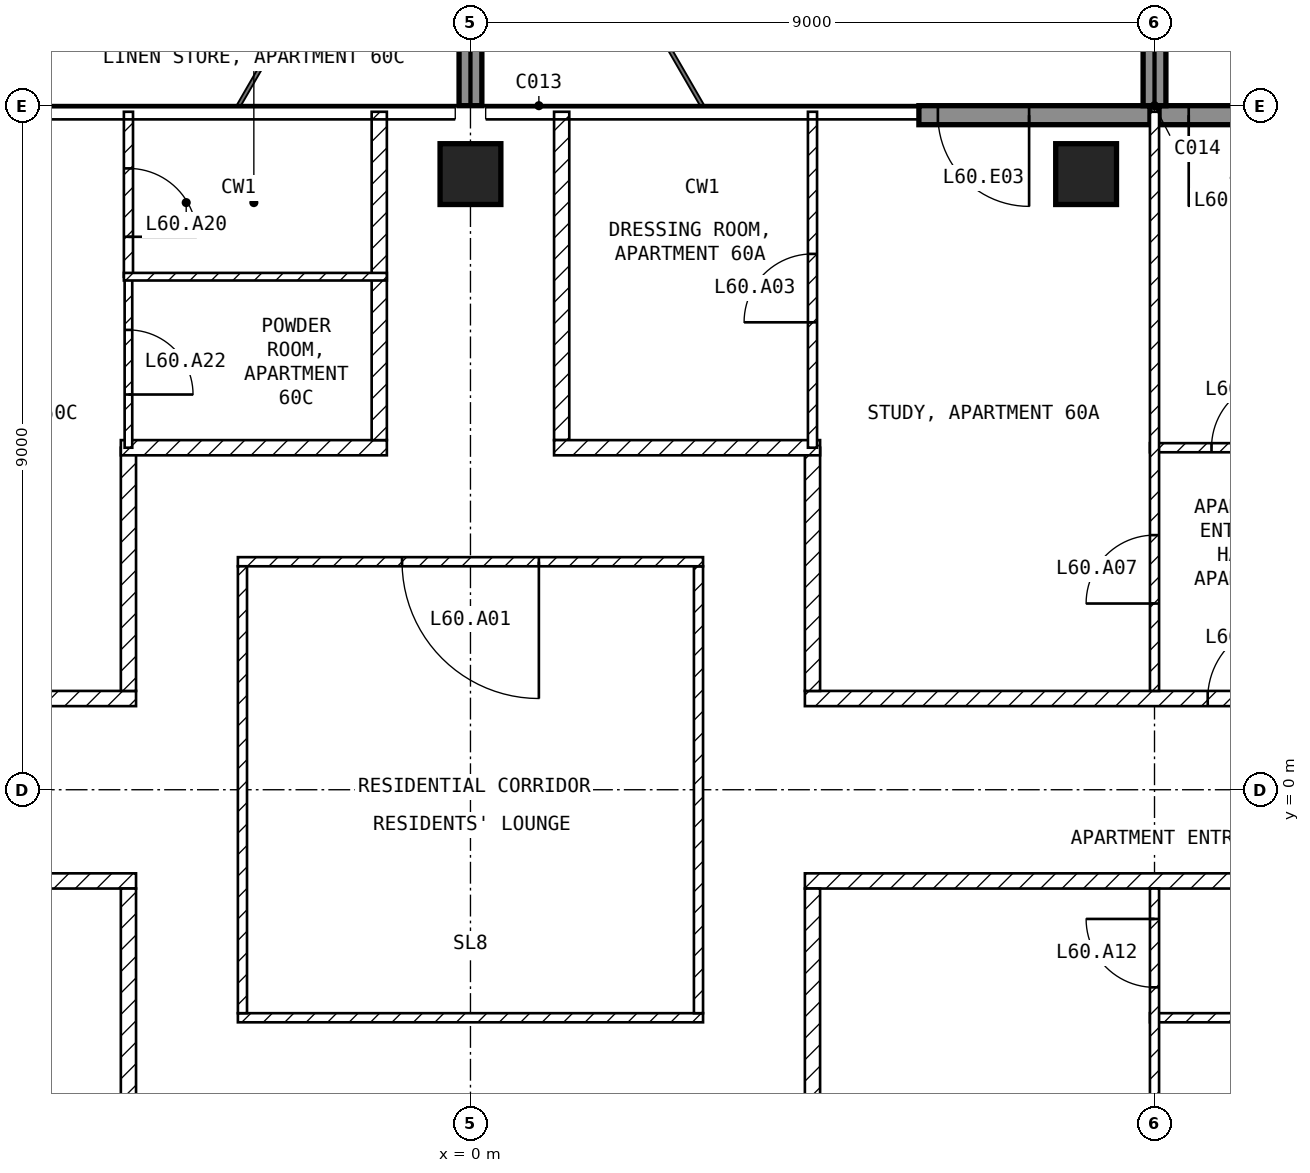
"""IFC4 building model, lengths in metres.
Left out: names, types, materials, properties, quantities, classifications, styles, units other than length and angle.
Written with IfcOpenShell. Run it as: python <this file> out.ifc"""

import sys

from ifc_helpers import new_model, si_unit, direction, frame, frame_2d, origin, origin_2d, place, context, subcontext, project, spatial, rectangle, extrude, element, fill, save


model = new_model("IFC4")
c1 = context("Model", 3, precision=1e-05, world=origin(), true_north=direction((0.0, 1.0)))
c2 = subcontext(c1, "Body", "Model", "MODEL_VIEW")
j1 = project(units=[si_unit("LENGTHUNIT", "METRE"), si_unit("PLANEANGLEUNIT", "RADIAN")], contexts=[c1])
p1 = place(None, origin())
s1 = spatial("IfcSite", under=j1, at=p1, CompositionType="ELEMENT")
p2 = place(p1, origin())
s2 = spatial("IfcBuilding", under=s1, at=p2, CompositionType="ELEMENT")
p3 = place(p2, frame((0.0, 0.0, 239.5)))
s3 = spatial("IfcBuildingStorey", under=s2, at=p3, CompositionType="ELEMENT", Elevation=239.5)
for number, where, z_axis, x_axis in (
    (1, (0.0, 8.1, -0.25), (0.0, 0.0, 1.0), (1.0, 0.0, 0.0)),
    (2, (8.1, 8.1, -0.25), (0.0, 0.0, 1.0), (1.0, 0.0, 0.0)),
):
    element("IfcColumn", number, at=place(p3, frame(where, z_axis=z_axis, x_axis=x_axis)), inside=s3, PredefinedType="COLUMN", context=c2, shape_type="SweptSolid", body=[
        extrude(rectangle(XDim=0.8, YDim=0.8, at=origin_2d()), origin(), (0.0, 0.0, 1.0), 3.5),
    ])
p4 = place(p3, frame((10.9, 8.875, 0.0), z_axis=(0.0, 0.0, 1.0), x_axis=(-1.0, 0.0, 0.0)))
e3 = element("IfcWall", 3, at=p4, inside=s3, PredefinedType="SOLIDWALL", context=c2, shape_type="SweptSolid", body=[
    extrude(rectangle(XDim=1.84, YDim=0.25, at=frame_2d((0.92, 0.0))), origin(), (0.0, 0.0, 1.0), 3.25),
])
p5 = place(p4, frame((0.25, 0.0, 0.0)))
e4 = element("IfcOpeningElement", 4, at=p5, cuts=e3, PredefinedType="OPENING", context=c2, shape_type="SweptSolid", body=[
    extrude(rectangle(XDim=1.2, YDim=2.4, at=frame_2d((0.6, 1.2))), frame((0.0, 0.135, 0.0), z_axis=(0.0, -1.0, 0.0), x_axis=(1.0, 0.0, 0.0)), (0.0, 0.0, 1.0), 0.27),
])
p6 = place(p3, frame((8.94, 8.875, 0.0), z_axis=(0.0, 0.0, 1.0), x_axis=(-1.0, 0.0, 0.0)))
e5 = element("IfcWall", 5, at=p6, inside=s3, PredefinedType="SOLIDWALL", context=c2, shape_type="SweptSolid", body=[
    extrude(rectangle(XDim=3.04, YDim=0.25, at=frame_2d((1.52, 0.0))), origin(), (0.0, 0.0, 1.0), 3.25),
])
p7 = place(p6, frame((1.59, 0.0, 0.0)))
e6 = element("IfcOpeningElement", 6, at=p7, cuts=e5, PredefinedType="OPENING", context=c2, shape_type="SweptSolid", body=[
    extrude(rectangle(XDim=1.2, YDim=2.4, at=frame_2d((0.6, 1.2))), frame((0.0, 0.135, 0.0), z_axis=(0.0, -1.0, 0.0), x_axis=(1.0, 0.0, 0.0)), (0.0, 0.0, 1.0), 0.27),
])
for number, where, z_axis, x_axis in (
    (7, (0.0, 9.0, 0.0), (0.0, 0.0, 1.0), (0.0, 1.0, 0.0)),
    (8, (9.0, 9.0, 0.0), (0.0, 0.0, 1.0), (0.0, 1.0, 0.0)),
):
    element("IfcWall", number, at=place(p3, frame(where, z_axis=z_axis, x_axis=x_axis)), inside=s3, PredefinedType="SOLIDWALL", context=c2, shape_type="SweptSolid", body=[
        extrude(rectangle(XDim=2.7, YDim=0.3, at=frame_2d((1.35, 0.0))), origin(), (0.0, 0.0, 1.0), 3.25),
    ])
p8 = place(p3, frame((-3.06, -3.0, 0.0), z_axis=(0.0, 0.0, 1.0), x_axis=(1.0, 0.0, 0.0)))
e9 = element("IfcWall", 9, at=p8, inside=s3, PredefinedType="PARTITIONING", context=c2, shape_type="SweptSolid", body=[
    extrude(rectangle(XDim=6.12, YDim=0.12, at=frame_2d((3.06, 0.0))), origin(), (0.0, 0.0, 1.0), 3.25),
])
p9 = place(p3, frame((3.0, -2.94, 0.0), z_axis=(0.0, 0.0, 1.0), x_axis=(0.0, 1.0, 0.0)))
e10 = element("IfcWall", 10, at=p9, inside=s3, PredefinedType="PARTITIONING", context=c2, shape_type="SweptSolid", body=[
    extrude(rectangle(XDim=5.88, YDim=0.12, at=frame_2d((2.94, 0.0))), origin(), (0.0, 0.0, 1.0), 3.25),
])
p10 = place(p3, frame((3.06, 3.0, 0.0), z_axis=(0.0, 0.0, 1.0), x_axis=(-1.0, 0.0, 0.0)))
e11 = element("IfcWall", 11, at=p10, inside=s3, PredefinedType="PARTITIONING", context=c2, shape_type="SweptSolid", body=[
    extrude(rectangle(XDim=6.12, YDim=0.12, at=frame_2d((3.06, 0.0))), origin(), (0.0, 0.0, 1.0), 3.25),
])
p11 = place(p10, frame((2.16, 0.0, 0.0)))
e12 = element("IfcOpeningElement", 12, at=p11, cuts=e11, PredefinedType="OPENING", context=c2, shape_type="SweptSolid", body=[
    extrude(rectangle(XDim=1.8, YDim=2.1, at=frame_2d((0.9, 1.05))), frame((0.0, 0.07, 0.0), z_axis=(0.0, -1.0, 0.0), x_axis=(1.0, 0.0, 0.0)), (0.0, 0.0, 1.0), 0.14),
])
p12 = place(p3, frame((-3.0, 2.94, 0.0), z_axis=(0.0, 0.0, 1.0), x_axis=(0.0, -1.0, 0.0)))
e13 = element("IfcWall", 13, at=p12, inside=s3, PredefinedType="PARTITIONING", context=c2, shape_type="SweptSolid", body=[
    extrude(rectangle(XDim=5.88, YDim=0.12, at=frame_2d((2.94, 0.0))), origin(), (0.0, 0.0, 1.0), 3.25),
])
p13 = place(p3, frame((4.4, 1.2, 0.0), z_axis=(0.0, 0.0, 1.0), x_axis=(1.0, 0.0, 0.0)))
e14 = element("IfcWall", 14, at=p13, inside=s3, PredefinedType="PARTITIONING", context=c2, shape_type="SweptSolid", body=[
    extrude(rectangle(XDim=17.2, YDim=0.2, at=frame_2d((8.6, 0.0))), origin(), (0.0, 0.0, 1.0), 3.25),
])
p14 = place(p13, frame((5.3, 0.0, 0.0)))
e15 = element("IfcOpeningElement", 15, at=p14, cuts=e14, PredefinedType="OPENING", context=c2, shape_type="SweptSolid", body=[
    extrude(rectangle(XDim=1.0, YDim=2.1, at=frame_2d((0.5, 1.05))), frame((0.0, 0.11, 0.0), z_axis=(0.0, -1.0, 0.0), x_axis=(1.0, 0.0, 0.0)), (0.0, 0.0, 1.0), 0.22),
])
p15 = place(p3, frame((4.5, 4.5, 0.0), z_axis=(0.0, 0.0, 1.0), x_axis=(0.0, -1.0, 0.0)))
e16 = element("IfcWall", 16, at=p15, inside=s3, PredefinedType="PARTITIONING", context=c2, shape_type="SweptSolid", body=[
    extrude(rectangle(XDim=3.2, YDim=0.2, at=frame_2d((1.6, 0.0))), origin(), (0.0, 0.0, 1.0), 3.25),
])
p16 = place(p3, frame((1.2, 8.92, 0.0), z_axis=(0.0, 0.0, 1.0), x_axis=(0.0, -1.0, 0.0)))
e17 = element("IfcWall", 17, at=p16, inside=s3, PredefinedType="PARTITIONING", context=c2, shape_type="SweptSolid", body=[
    extrude(rectangle(XDim=4.32, YDim=0.2, at=frame_2d((2.16, 0.0))), origin(), (0.0, 0.0, 1.0), 3.25),
])
p17 = place(p3, frame((1.1, 4.5, 0.0), z_axis=(0.0, 0.0, 1.0), x_axis=(1.0, 0.0, 0.0)))
e18 = element("IfcWall", 18, at=p17, inside=s3, PredefinedType="PARTITIONING", context=c2, shape_type="SweptSolid", body=[
    extrude(rectangle(XDim=3.5, YDim=0.2, at=frame_2d((1.75, 0.0))), origin(), (0.0, 0.0, 1.0), 3.25),
])
p18 = place(p3, frame((21.6, -1.2, 0.0), z_axis=(0.0, 0.0, 1.0), x_axis=(-1.0, 0.0, 0.0)))
e19 = element("IfcWall", 19, at=p18, inside=s3, PredefinedType="PARTITIONING", context=c2, shape_type="SweptSolid", body=[
    extrude(rectangle(XDim=17.2, YDim=0.2, at=frame_2d((8.6, 0.0))), origin(), (0.0, 0.0, 1.0), 3.25),
])
p19 = place(p18, frame((10.3, 0.0, 0.0)))
e20 = element("IfcOpeningElement", 20, at=p19, cuts=e19, PredefinedType="OPENING", context=c2, shape_type="SweptSolid", body=[
    extrude(rectangle(XDim=1.0, YDim=2.1, at=frame_2d((0.5, 1.05))), frame((0.0, 0.11, 0.0), z_axis=(0.0, -1.0, 0.0), x_axis=(1.0, 0.0, 0.0)), (0.0, 0.0, 1.0), 0.22),
])
p20 = place(p3, frame((4.5, -1.3, 0.0), z_axis=(0.0, 0.0, 1.0), x_axis=(0.0, -1.0, 0.0)))
e21 = element("IfcWall", 21, at=p20, inside=s3, PredefinedType="PARTITIONING", context=c2, shape_type="SweptSolid", body=[
    extrude(rectangle(XDim=3.2, YDim=0.2, at=frame_2d((1.6, 0.0))), origin(), (0.0, 0.0, 1.0), 3.25),
])
p21 = place(p3, frame((-21.6, 1.2, 0.0), z_axis=(0.0, 0.0, 1.0), x_axis=(1.0, 0.0, 0.0)))
e22 = element("IfcWall", 22, at=p21, inside=s3, PredefinedType="PARTITIONING", context=c2, shape_type="SweptSolid", body=[
    extrude(rectangle(XDim=17.2, YDim=0.2, at=frame_2d((8.6, 0.0))), origin(), (0.0, 0.0, 1.0), 3.25),
])
p22 = place(p21, frame((6.1, 0.0, 0.0)))
e23 = element("IfcOpeningElement", 23, at=p22, cuts=e22, PredefinedType="OPENING", context=c2, shape_type="SweptSolid", body=[
    extrude(rectangle(XDim=1.0, YDim=2.1, at=frame_2d((0.5, 1.05))), frame((0.0, 0.11, 0.0), z_axis=(0.0, -1.0, 0.0), x_axis=(1.0, 0.0, 0.0)), (0.0, 0.0, 1.0), 0.22),
])
p23 = place(p3, frame((-4.5, 1.3, 0.0), z_axis=(0.0, 0.0, 1.0), x_axis=(0.0, 1.0, 0.0)))
e24 = element("IfcWall", 24, at=p23, inside=s3, PredefinedType="PARTITIONING", context=c2, shape_type="SweptSolid", body=[
    extrude(rectangle(XDim=3.2, YDim=0.2, at=frame_2d((1.6, 0.0))), origin(), (0.0, 0.0, 1.0), 3.25),
])
p24 = place(p3, frame((-4.6, 4.5, 0.0), z_axis=(0.0, 0.0, 1.0), x_axis=(1.0, 0.0, 0.0)))
e25 = element("IfcWall", 25, at=p24, inside=s3, PredefinedType="PARTITIONING", context=c2, shape_type="SweptSolid", body=[
    extrude(rectangle(XDim=3.5, YDim=0.2, at=frame_2d((1.75, 0.0))), origin(), (0.0, 0.0, 1.0), 3.25),
])
p25 = place(p3, frame((-1.2, 4.6, 0.0), z_axis=(0.0, 0.0, 1.0), x_axis=(0.0, 1.0, 0.0)))
e26 = element("IfcWall", 26, at=p25, inside=s3, PredefinedType="PARTITIONING", context=c2, shape_type="SweptSolid", body=[
    extrude(rectangle(XDim=4.32, YDim=0.2, at=frame_2d((2.16, 0.0))), origin(), (0.0, 0.0, 1.0), 3.25),
])
p26 = place(p3, frame((-4.4, -1.2, 0.0), z_axis=(0.0, 0.0, 1.0), x_axis=(-1.0, 0.0, 0.0)))
e27 = element("IfcWall", 27, at=p26, inside=s3, PredefinedType="PARTITIONING", context=c2, shape_type="SweptSolid", body=[
    extrude(rectangle(XDim=17.2, YDim=0.2, at=frame_2d((8.6, 0.0))), origin(), (0.0, 0.0, 1.0), 3.25),
])
p27 = place(p26, frame((5.9, 0.0, 0.0)))
e28 = element("IfcOpeningElement", 28, at=p27, cuts=e27, PredefinedType="OPENING", context=c2, shape_type="SweptSolid", body=[
    extrude(rectangle(XDim=1.0, YDim=2.1, at=frame_2d((0.5, 1.05))), frame((0.0, 0.11, 0.0), z_axis=(0.0, -1.0, 0.0), x_axis=(1.0, 0.0, 0.0)), (0.0, 0.0, 1.0), 0.22),
])
p28 = place(p3, frame((-4.5, -4.5, 0.0), z_axis=(0.0, 0.0, 1.0), x_axis=(0.0, 1.0, 0.0)))
e29 = element("IfcWall", 29, at=p28, inside=s3, PredefinedType="PARTITIONING", context=c2, shape_type="SweptSolid", body=[
    extrude(rectangle(XDim=3.2, YDim=0.2, at=frame_2d((1.6, 0.0))), origin(), (0.0, 0.0, 1.0), 3.25),
])
p29 = place(p3, frame((8.94, 4.5, 0.0), z_axis=(0.0, 0.0, 1.0), x_axis=(1.0, 0.0, 0.0)))
e30 = element("IfcWall", 30, at=p29, inside=s3, PredefinedType="PARTITIONING", context=c2, shape_type="SweptSolid", body=[
    extrude(rectangle(XDim=5.46, YDim=0.12, at=frame_2d((2.73, 0.0))), origin(), (0.0, 0.0, 1.0), 3.25),
])
p30 = place(p29, frame((0.81, 0.0, 0.0)))
e31 = element("IfcOpeningElement", 31, at=p30, cuts=e30, PredefinedType="OPENING", context=c2, shape_type="SweptSolid", body=[
    extrude(rectangle(XDim=0.9, YDim=2.1, at=frame_2d((0.45, 1.05))), frame((0.0, 0.07, 0.0), z_axis=(0.0, -1.0, 0.0), x_axis=(1.0, 0.0, 0.0)), (0.0, 0.0, 1.0), 0.14),
])
p31 = place(p3, frame((9.0, 1.3, 0.0), z_axis=(0.0, 0.0, 1.0), x_axis=(0.0, 1.0, 0.0)))
e32 = element("IfcWall", 32, at=p31, inside=s3, PredefinedType="PARTITIONING", context=c2, shape_type="SweptSolid", body=[
    extrude(rectangle(XDim=7.62, YDim=0.12, at=frame_2d((3.81, 0.0))), origin(), (0.0, 0.0, 1.0), 3.25),
])
p32 = place(p31, frame((1.15, 0.0, 0.0)))
e33 = element("IfcOpeningElement", 33, at=p32, cuts=e32, PredefinedType="OPENING", context=c2, shape_type="SweptSolid", body=[
    extrude(rectangle(XDim=0.9, YDim=2.1, at=frame_2d((0.45, 1.05))), frame((0.0, 0.07, 0.0), z_axis=(0.0, -1.0, 0.0), x_axis=(1.0, 0.0, 0.0)), (0.0, 0.0, 1.0), 0.14),
])
p33 = place(p3, frame((4.5, 4.5, 0.0), z_axis=(0.0, 0.0, 1.0), x_axis=(0.0, 1.0, 0.0)))
e34 = element("IfcWall", 34, at=p33, inside=s3, PredefinedType="PARTITIONING", context=c2, shape_type="SweptSolid", body=[
    extrude(rectangle(XDim=4.42, YDim=0.12, at=frame_2d((2.21, 0.0))), origin(), (0.0, 0.0, 1.0), 3.25),
])
p34 = place(p33, frame((1.65, 0.0, 0.0)))
e35 = element("IfcOpeningElement", 35, at=p34, cuts=e34, PredefinedType="OPENING", context=c2, shape_type="SweptSolid", body=[
    extrude(rectangle(XDim=0.9, YDim=2.1, at=frame_2d((0.45, 1.05))), frame((0.0, 0.07, 0.0), z_axis=(0.0, -1.0, 0.0), x_axis=(1.0, 0.0, 0.0)), (0.0, 0.0, 1.0), 0.14),
])
p35 = place(p3, frame((17.4, -3.0, 0.0), z_axis=(0.0, 0.0, 1.0), x_axis=(-1.0, 0.0, 0.0)))
e36 = element("IfcWall", 36, at=p35, inside=s3, PredefinedType="PARTITIONING", context=c2, shape_type="SweptSolid", body=[
    extrude(rectangle(XDim=8.46, YDim=0.12, at=frame_2d((4.23, 0.0))), origin(), (0.0, 0.0, 1.0), 3.25),
])
p36 = place(p35, frame((0.45, 0.0, 0.0)))
e37 = element("IfcOpeningElement", 37, at=p36, cuts=e36, PredefinedType="OPENING", context=c2, shape_type="SweptSolid", body=[
    extrude(rectangle(XDim=0.9, YDim=2.1, at=frame_2d((0.45, 1.05))), frame((0.0, 0.07, 0.0), z_axis=(0.0, -1.0, 0.0), x_axis=(1.0, 0.0, 0.0)), (0.0, 0.0, 1.0), 0.14),
])
p37 = place(p35, frame((6.15, 0.0, 0.0)))
e38 = element("IfcOpeningElement", 38, at=p37, cuts=e36, PredefinedType="OPENING", context=c2, shape_type="SweptSolid", body=[
    extrude(rectangle(XDim=0.9, YDim=2.1, at=frame_2d((0.45, 1.05))), frame((0.0, 0.07, 0.0), z_axis=(0.0, -1.0, 0.0), x_axis=(1.0, 0.0, 0.0)), (0.0, 0.0, 1.0), 0.14),
])
p38 = place(p3, frame((9.0, -8.92, 0.0), z_axis=(0.0, 0.0, 1.0), x_axis=(0.0, 1.0, 0.0)))
e39 = element("IfcWall", 39, at=p38, inside=s3, PredefinedType="PARTITIONING", context=c2, shape_type="SweptSolid", body=[
    extrude(rectangle(XDim=7.62, YDim=0.12, at=frame_2d((3.81, 0.0))), origin(), (0.0, 0.0, 1.0), 3.25),
])
p39 = place(p38, frame((6.32, 0.0, 0.0)))
e40 = element("IfcOpeningElement", 40, at=p39, cuts=e39, PredefinedType="OPENING", context=c2, shape_type="SweptSolid", body=[
    extrude(rectangle(XDim=0.9, YDim=2.1, at=frame_2d((0.45, 1.05))), frame((0.0, 0.07, 0.0), z_axis=(0.0, -1.0, 0.0), x_axis=(1.0, 0.0, 0.0)), (0.0, 0.0, 1.0), 0.14),
])
p40 = place(p3, frame((-4.5, 6.75, 0.0), z_axis=(0.0, 0.0, 1.0), x_axis=(0.0, -1.0, 0.0)))
e41 = element("IfcWall", 41, at=p40, inside=s3, PredefinedType="PARTITIONING", context=c2, shape_type="SweptSolid", body=[
    extrude(rectangle(XDim=2.25, YDim=0.1, at=frame_2d((1.125, 0.0))), origin(), (0.0, 0.0, 1.0), 3.25),
])
p41 = place(p40, frame((0.7, 0.0, 0.0)))
e42 = element("IfcOpeningElement", 42, at=p41, cuts=e41, PredefinedType="OPENING", context=c2, shape_type="SweptSolid", body=[
    extrude(rectangle(XDim=0.85, YDim=2.1, at=frame_2d((0.425, 1.05))), frame((0.0, 0.06, 0.0), z_axis=(0.0, -1.0, 0.0), x_axis=(1.0, 0.0, 0.0)), (0.0, 0.0, 1.0), 0.12),
])
p42 = place(p3, frame((-4.5, 8.92, 0.0), z_axis=(0.0, 0.0, 1.0), x_axis=(0.0, -1.0, 0.0)))
e43 = element("IfcWall", 43, at=p42, inside=s3, PredefinedType="PARTITIONING", context=c2, shape_type="SweptSolid", body=[
    extrude(rectangle(XDim=2.17, YDim=0.12, at=frame_2d((1.085, 0.0))), origin(), (0.0, 0.0, 1.0), 3.25),
])
p43 = place(p42, frame((0.745, 0.0, 0.0)))
e44 = element("IfcOpeningElement", 44, at=p43, cuts=e43, PredefinedType="OPENING", context=c2, shape_type="SweptSolid", body=[
    extrude(rectangle(XDim=0.9, YDim=2.1, at=frame_2d((0.45, 1.05))), frame((0.0, 0.07, 0.0), z_axis=(0.0, -1.0, 0.0), x_axis=(1.0, 0.0, 0.0)), (0.0, 0.0, 1.0), 0.14),
])
p44 = place(p3, frame((-4.56, 6.75, 0.0), z_axis=(0.0, 0.0, 1.0), x_axis=(1.0, 0.0, 0.0)))
e45 = element("IfcWall", 45, at=p44, inside=s3, PredefinedType="PARTITIONING", context=c2, shape_type="SweptSolid", body=[
    extrude(rectangle(XDim=3.46, YDim=0.1, at=frame_2d((1.73, 0.0))), origin(), (0.0, 0.0, 1.0), 3.25),
])
p45 = place(p5, origin())
e46 = element("IfcDoor", 46, at=p45, inside=s3, OperationType="SINGLE_SWING_RIGHT", PredefinedType="DOOR", context=c2, shape_type="SweptSolid", body=[
    extrude(rectangle(XDim=1.2, YDim=2.4, at=frame_2d((0.6, 1.2))), frame((0.0, 0.025, 0.0), z_axis=(0.0, -1.0, 0.0), x_axis=(1.0, 0.0, 0.0)), (0.0, 0.0, 1.0), 0.05),
])
fill(e4, e46)
p46 = place(p7, origin())
e47 = element("IfcDoor", 47, at=p46, inside=s3, OperationType="SINGLE_SWING_LEFT", PredefinedType="DOOR", context=c2, shape_type="SweptSolid", body=[
    extrude(rectangle(XDim=1.2, YDim=2.4, at=frame_2d((0.6, 1.2))), frame((0.0, 0.025, 0.0), z_axis=(0.0, -1.0, 0.0), x_axis=(1.0, 0.0, 0.0)), (0.0, 0.0, 1.0), 0.05),
])
fill(e6, e47)
p47 = place(p11, origin())
e48 = element("IfcDoor", 48, at=p47, inside=s3, OperationType="SINGLE_SWING_LEFT", PredefinedType="DOOR", context=c2, shape_type="SweptSolid", body=[
    extrude(rectangle(XDim=1.8, YDim=2.1, at=frame_2d((0.9, 1.05))), frame((0.0, 0.025, 0.0), z_axis=(0.0, -1.0, 0.0), x_axis=(1.0, 0.0, 0.0)), (0.0, 0.0, 1.0), 0.05),
])
fill(e12, e48)
p48 = place(p34, origin())
e49 = element("IfcDoor", 49, at=p48, inside=s3, OperationType="SINGLE_SWING_LEFT", PredefinedType="DOOR", context=c2, shape_type="SweptSolid", body=[
    extrude(rectangle(XDim=0.9, YDim=2.1, at=frame_2d((0.45, 1.05))), frame((0.0, 0.025, 0.0), z_axis=(0.0, -1.0, 0.0), x_axis=(1.0, 0.0, 0.0)), (0.0, 0.0, 1.0), 0.05),
])
fill(e35, e49)
p49 = place(p30, origin())
e50 = element("IfcDoor", 50, at=p49, inside=s3, OperationType="SINGLE_SWING_RIGHT", PredefinedType="DOOR", context=c2, shape_type="SweptSolid", body=[
    extrude(rectangle(XDim=0.9, YDim=2.1, at=frame_2d((0.45, 1.05))), frame((0.0, 0.025, 0.0), z_axis=(0.0, -1.0, 0.0), x_axis=(1.0, 0.0, 0.0)), (0.0, 0.0, 1.0), 0.05),
])
fill(e31, e50)
p50 = place(p32, origin())
e51 = element("IfcDoor", 51, at=p50, inside=s3, OperationType="SINGLE_SWING_LEFT", PredefinedType="DOOR", context=c2, shape_type="SweptSolid", body=[
    extrude(rectangle(XDim=0.9, YDim=2.1, at=frame_2d((0.45, 1.05))), frame((0.0, 0.025, 0.0), z_axis=(0.0, -1.0, 0.0), x_axis=(1.0, 0.0, 0.0)), (0.0, 0.0, 1.0), 0.05),
])
fill(e33, e51)
p51 = place(p39, origin())
e52 = element("IfcDoor", 52, at=p51, inside=s3, OperationType="SINGLE_SWING_RIGHT", PredefinedType="DOOR", context=c2, shape_type="SweptSolid", body=[
    extrude(rectangle(XDim=0.9, YDim=2.1, at=frame_2d((0.45, 1.05))), frame((0.0, 0.025, 0.0), z_axis=(0.0, -1.0, 0.0), x_axis=(1.0, 0.0, 0.0)), (0.0, 0.0, 1.0), 0.05),
])
fill(e40, e52)
p52 = place(p43, origin())
e53 = element("IfcDoor", 53, at=p52, inside=s3, OperationType="SINGLE_SWING_RIGHT", PredefinedType="DOOR", context=c2, shape_type="SweptSolid", body=[
    extrude(rectangle(XDim=0.9, YDim=2.1, at=frame_2d((0.45, 1.05))), frame((0.0, 0.025, 0.0), z_axis=(0.0, -1.0, 0.0), x_axis=(1.0, 0.0, 0.0)), (0.0, 0.0, 1.0), 0.05),
])
fill(e44, e53)
p53 = place(p41, origin())
e54 = element("IfcDoor", 54, at=p53, inside=s3, OperationType="SINGLE_SWING_RIGHT", PredefinedType="DOOR", context=c2, shape_type="SweptSolid", body=[
    extrude(rectangle(XDim=0.85, YDim=2.1, at=frame_2d((0.425, 1.05))), frame((0.0, 0.025, 0.0), z_axis=(0.0, -1.0, 0.0), x_axis=(1.0, 0.0, 0.0)), (0.0, 0.0, 1.0), 0.05),
])
fill(e42, e54)
p54 = place(p14, origin())
e55 = element("IfcDoor", 55, at=p54, inside=s3, OperationType="SINGLE_SWING_RIGHT", PredefinedType="DOOR", context=c2, shape_type="SweptSolid", body=[
    extrude(rectangle(XDim=1.0, YDim=2.1, at=frame_2d((0.5, 1.05))), frame((0.0, 0.025, 0.0), z_axis=(0.0, -1.0, 0.0), x_axis=(1.0, 0.0, 0.0)), (0.0, 0.0, 1.0), 0.05),
])
fill(e15, e55)
save(model, sys.argv[1])
